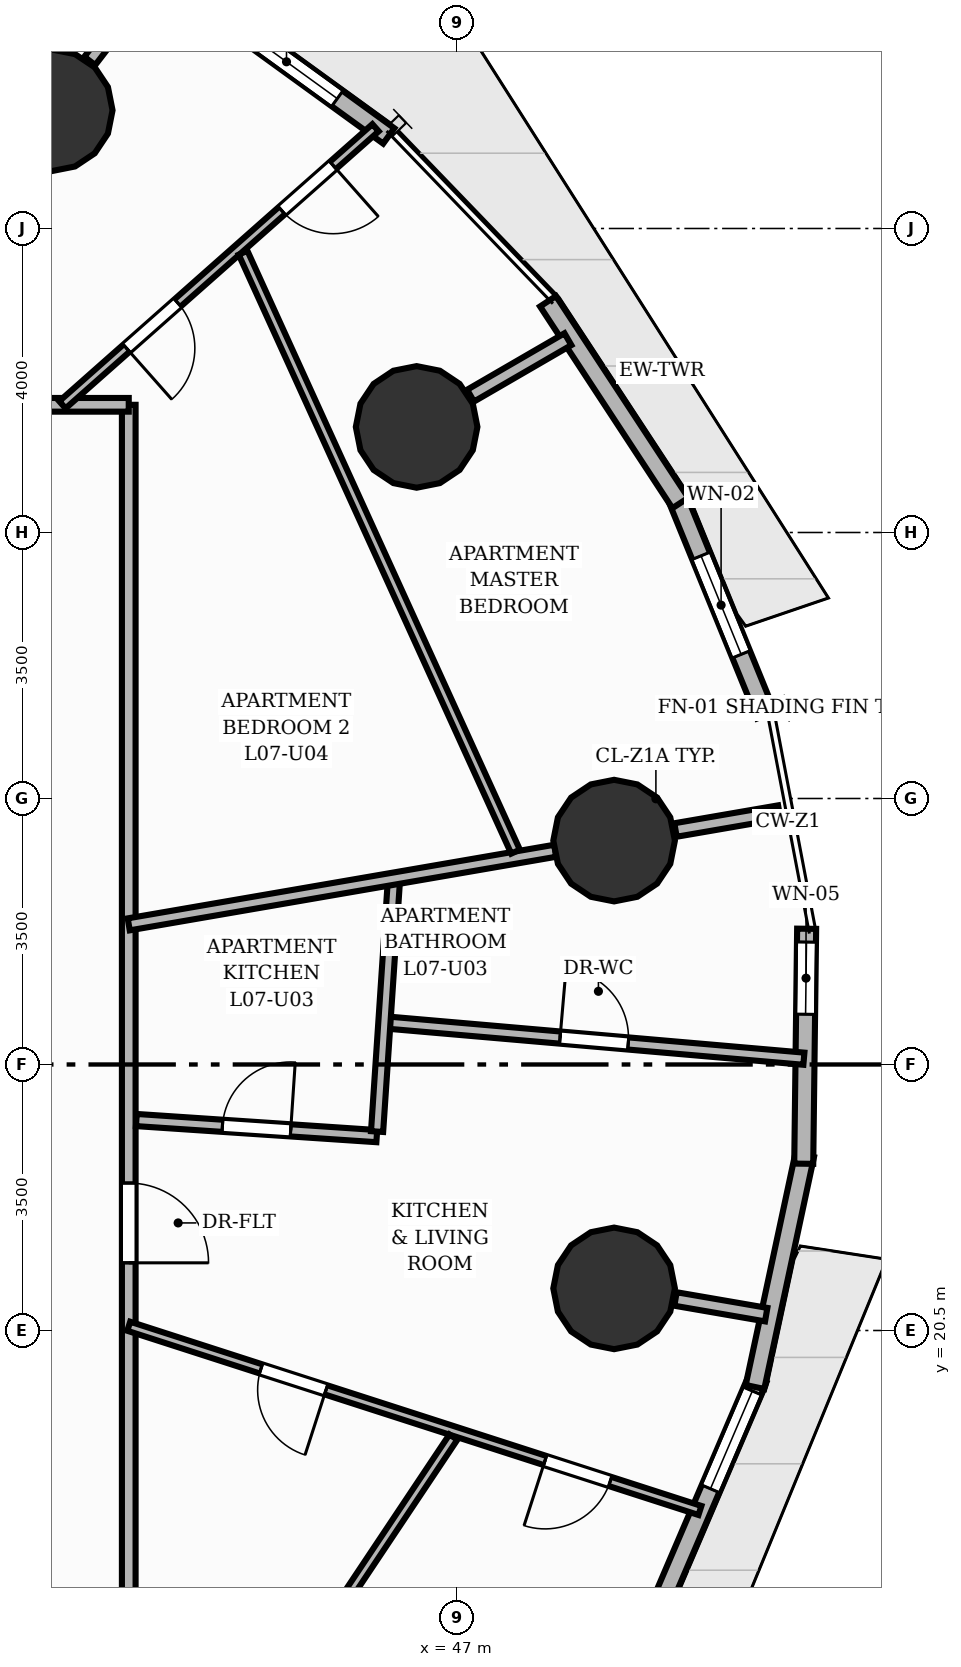
"""IFC4 building model, lengths in metres.
Left out: names, types, materials, properties, quantities, classifications, styles, units other than length and angle.
Written with IfcOpenShell. Run it as: python <this file> out.ifc"""

import sys

from ifc_helpers import new_model, si_unit, direction, frame, frame_2d, origin, origin_2d, place, context, subcontext, project, spatial, rectangle, circle, extrude, element, fill, save


model = new_model("IFC4")
c1 = context("Model", 3, precision=1e-05, world=origin(), true_north=direction((0.0, 1.0)))
c2 = subcontext(c1, "Body", "Model", "MODEL_VIEW")
j1 = project(units=[si_unit("LENGTHUNIT", "METRE"), si_unit("PLANEANGLEUNIT", "RADIAN")], contexts=[c1])
p1 = place(None, origin())
s1 = spatial("IfcSite", under=j1, at=p1, CompositionType="ELEMENT")
p2 = place(p1, origin())
s2 = spatial("IfcBuilding", under=s1, at=p2, CompositionType="ELEMENT")
p3 = place(p2, frame((0.0, 0.0, 28.0)))
s3 = spatial("IfcBuildingStorey", under=s2, at=p3, CompositionType="ELEMENT", Elevation=28.0)
for number, where, z_axis, x_axis in (
    (1, (49.066, 26.946, 0.0), (0.0, 0.0, 1.0), (1.0, 0.0, 0.0)),
    (2, (46.468, 32.389, 0.0), (0.0, 0.0, 1.0), (1.0, 0.0, 0.0)),
    (3, (41.667, 36.555, 0.0), (0.0, 0.0, 1.0), (1.0, 0.0, 0.0)),
    (4, (49.066, 21.054, 0.0), (0.0, 0.0, 1.0), (1.0, 0.0, 0.0)),
):
    element("IfcColumn", number, at=place(p3, frame(where, z_axis=z_axis, x_axis=x_axis)), inside=s3, PredefinedType="COLUMN", context=c2, shape_type="SweptSolid", body=[
        extrude(circle(Radius=0.8, at=origin_2d()), origin(), (0.0, 0.0, 1.0), 3.2),
    ])
p4 = place(p3, frame((49.885, 31.489, 0.0), z_axis=(0.0, 0.0, 1.0), x_axis=(0.377493207518, -0.926012353199, 0.0)))
e5 = element("IfcWall", 5, at=p4, inside=s3, PredefinedType="SOLIDWALL", context=c2, shape_type="SweptSolid", body=[
    extrude(rectangle(XDim=3.121, YDim=0.25, at=frame_2d((1.56, 0.0))), origin(), (0.0, 0.0, 1.0), 2.96),
])
p5 = place(p4, frame((0.86, 0.0, 0.85)))
e6 = element("IfcOpeningElement", 6, at=p5, cuts=e5, PredefinedType="OPENING", context=c2, shape_type="SweptSolid", body=[
    extrude(rectangle(XDim=1.4, YDim=1.55, at=frame_2d((0.7, 0.775))), frame((0.0, 0.135, 0.0), z_axis=(0.0, -1.0, 0.0), x_axis=(1.0, 0.0, 0.0)), (0.0, 0.0, 1.0), 0.27),
])
p6 = place(p3, frame((48.196, 34.042, 0.0), z_axis=(0.0, 0.0, 1.0), x_axis=(0.548579153619, -0.836098625889, 0.0)))
e7 = element("IfcWall", 7, at=p6, inside=s3, PredefinedType="SOLIDWALL", context=c2, shape_type="SweptSolid", body=[
    extrude(rectangle(XDim=3.174, YDim=0.25, at=frame_2d((1.587, 0.0))), origin(), (0.0, 0.0, 1.0), 2.96),
])
p7 = place(p3, frame((43.411, 38.168, 0.0), z_axis=(0.0, 0.0, 1.0), x_axis=(0.809637503316, -0.58693024562, 0.0)))
e8 = element("IfcWall", 8, at=p7, inside=s3, PredefinedType="SOLIDWALL", context=c2, shape_type="SweptSolid", body=[
    extrude(rectangle(XDim=3.323, YDim=0.25, at=frame_2d((1.661, 0.0))), origin(), (0.0, 0.0, 1.0), 2.96),
])
p8 = place(p7, frame((0.836, 0.0, 0.85)))
e9 = element("IfcOpeningElement", 9, at=p8, cuts=e8, PredefinedType="OPENING", context=c2, shape_type="SweptSolid", body=[
    extrude(rectangle(XDim=1.65, YDim=1.55, at=frame_2d((0.825, 0.775))), frame((0.0, 0.135, 0.0), z_axis=(0.0, -1.0, 0.0), x_axis=(1.0, 0.0, 0.0)), (0.0, 0.0, 1.0), 0.27),
])
p9 = place(p3, frame((50.954, 19.865, 0.0), z_axis=(0.0, 0.0, 1.0), x_axis=(-0.393733630937, -0.91922457967, 0.0)))
e10 = element("IfcWall", 10, at=p9, inside=s3, PredefinedType="SOLIDWALL", context=c2, shape_type="SweptSolid", body=[
    extrude(rectangle(XDim=3.174, YDim=0.25, at=frame_2d((1.587, 0.0))), origin(), (0.0, 0.0, 1.0), 2.96),
])
p10 = place(p9, frame((0.175, 0.0, 0.85)))
e11 = element("IfcOpeningElement", 11, at=p10, cuts=e10, PredefinedType="OPENING", context=c2, shape_type="SweptSolid", body=[
    extrude(rectangle(XDim=1.4, YDim=1.55, at=frame_2d((0.7, 0.775))), frame((0.0, 0.135, 0.0), z_axis=(0.0, -1.0, 0.0), x_axis=(1.0, 0.0, 0.0)), (0.0, 0.0, 1.0), 0.27),
])
p11 = place(p3, frame((51.573, 22.808, 0.0), z_axis=(0.0, 0.0, 1.0), x_axis=(-0.209668000253, -0.977772637002, 0.0)))
e12 = element("IfcWall", 12, at=p11, inside=s3, PredefinedType="SOLIDWALL", context=c2, shape_type="SweptSolid", body=[
    extrude(rectangle(XDim=3.121, YDim=0.25, at=frame_2d((1.56, 0.0))), origin(), (0.0, 0.0, 1.0), 2.96),
])
p12 = place(p3, frame((51.599, 25.786, 0.0), z_axis=(0.0, 0.0, 1.0), x_axis=(-0.012397373015, -0.999923149618, 0.0)))
e13 = element("IfcWall", 13, at=p12, inside=s3, PredefinedType="SOLIDWALL", context=c2, shape_type="SweptSolid", body=[
    extrude(rectangle(XDim=3.092, YDim=0.25, at=frame_2d((1.546, 0.0))), origin(), (0.0, 0.0, 1.0), 2.96),
])
p13 = place(p12, frame((0.175, 0.0, 0.85)))
e14 = element("IfcOpeningElement", 14, at=p13, cuts=e13, PredefinedType="OPENING", context=c2, shape_type="SweptSolid", body=[
    extrude(rectangle(XDim=0.95, YDim=1.45, at=frame_2d((0.475, 0.725))), frame((0.0, 0.135, 0.0), z_axis=(0.0, -1.0, 0.0), x_axis=(1.0, 0.0, 0.0)), (0.0, 0.0, 1.0), 0.27),
])
p14 = place(p3, frame((49.874, 27.085, 0.0), z_axis=(0.0, 0.0, 1.0), x_axis=(0.985429571056, 0.170083980696, 0.0)))
e15 = element("IfcWall", 15, at=p14, inside=s3, PredefinedType="PARTITIONING", context=c2, shape_type="SweptSolid", body=[
    extrude(rectangle(XDim=1.385, YDim=0.18, at=frame_2d((0.693, 0.0))), origin(), (0.0, 0.0, 1.0), 2.178),
])
p15 = place(p3, frame((47.177, 32.8, 0.0), z_axis=(0.0, 0.0, 1.0), x_axis=(0.865049792178, 0.501686014408, 0.0)))
e16 = element("IfcWall", 16, at=p15, inside=s3, PredefinedType="PARTITIONING", context=c2, shape_type="SweptSolid", body=[
    extrude(rectangle(XDim=1.481, YDim=0.18, at=frame_2d((0.74, 0.0))), origin(), (0.0, 0.0, 1.0), 2.178),
])
p16 = place(p3, frame((42.167, 37.205, 0.0), z_axis=(0.0, 0.0, 1.0), x_axis=(0.609967804345, 0.792426196982, 0.0)))
e17 = element("IfcWall", 17, at=p16, inside=s3, PredefinedType="PARTITIONING", context=c2, shape_type="SweptSolid", body=[
    extrude(rectangle(XDim=1.377, YDim=0.18, at=frame_2d((0.688, 0.0))), origin(), (0.0, 0.0, 1.0), 2.178),
])
p17 = place(p3, frame((49.874, 20.915, 0.0), z_axis=(0.0, 0.0, 1.0), x_axis=(0.985412344637, -0.170183756676, 0.0)))
e18 = element("IfcWall", 18, at=p17, inside=s3, PredefinedType="PARTITIONING", context=c2, shape_type="SweptSolid", body=[
    extrude(rectangle(XDim=1.211, YDim=0.18, at=frame_2d((0.605, 0.0))), origin(), (0.0, 0.0, 1.0), 2.178),
])
p18 = place(p3, frame((42.68, 32.68, 0.0), z_axis=(0.0, 0.0, 1.0), x_axis=(0.0, -1.0, 0.0)))
e19 = element("IfcWall", 19, at=p18, inside=s3, PredefinedType="PARTITIONING", context=c2, shape_type="SweptSolid", body=[
    extrude(rectangle(XDim=17.36, YDim=0.18, at=frame_2d((8.68, 0.0))), origin(), (0.0, 0.0, 1.0), 2.955),
])
p19 = place(p18, frame((10.24, 0.0, 0.0)))
e20 = element("IfcOpeningElement", 20, at=p19, cuts=e19, PredefinedType="OPENING", context=c2, shape_type="SweptSolid", body=[
    extrude(rectangle(XDim=1.05, YDim=2.15, at=frame_2d((0.525, 1.075))), frame((0.0, 0.1, 0.0), z_axis=(0.0, -1.0, 0.0), x_axis=(1.0, 0.0, 0.0)), (0.0, 0.0, 1.0), 0.2),
])
p20 = place(p3, frame((30.102, 32.68, 0.0), z_axis=(0.0, 0.0, 1.0), x_axis=(1.0, 0.0, 0.0)))
e21 = element("IfcWall", 21, at=p20, inside=s3, PredefinedType="PARTITIONING", context=c2, shape_type="SweptSolid", body=[
    extrude(rectangle(XDim=12.578, YDim=0.18, at=frame_2d((6.289, 0.0))), origin(), (0.0, 0.0, 1.0), 2.955),
])
p21 = place(p20, frame((8.233, 0.0, 0.0)))
e22 = element("IfcOpeningElement", 22, at=p21, cuts=e21, PredefinedType="OPENING", context=c2, shape_type="SweptSolid", body=[
    extrude(rectangle(XDim=1.05, YDim=2.15, at=frame_2d((0.525, 1.075))), frame((0.0, 0.1, 0.0), z_axis=(0.0, -1.0, 0.0), x_axis=(1.0, 0.0, 0.0)), (0.0, 0.0, 1.0), 0.2),
])
p22 = place(p3, frame((46.044, 24.555, 0.0), z_axis=(0.0, 0.0, 1.0), x_axis=(0.996262385211, -0.086378584226, 0.0)))
e23 = element("IfcWall", 23, at=p22, inside=s3, PredefinedType="PLUMBINGWALL", context=c2, shape_type="SweptSolid", body=[
    extrude(rectangle(XDim=5.54, YDim=0.16, at=frame_2d((2.77, 0.0))), origin(), (0.0, 0.0, 1.0), 2.641),
])
p23 = place(p22, frame((2.32, 0.0, 0.0)))
e24 = element("IfcOpeningElement", 24, at=p23, cuts=e23, PredefinedType="OPENING", context=c2, shape_type="SweptSolid", body=[
    extrude(rectangle(XDim=0.9, YDim=2.1, at=frame_2d((0.45, 1.05))), frame((0.0, 0.09, 0.0), z_axis=(0.0, -1.0, 0.0), x_axis=(1.0, 0.0, 0.0)), (0.0, 0.0, 1.0), 0.18),
])
p24 = place(p3, frame((50.195, 18.132, 0.0), z_axis=(0.0, 0.0, 1.0), x_axis=(-0.951723769721, 0.306955804879, 0.0)))
e25 = element("IfcWall", 25, at=p24, inside=s3, PredefinedType="PARTITIONING", context=c2, shape_type="SweptSolid", body=[
    extrude(rectangle(XDim=7.896, YDim=0.125, at=frame_2d((3.948, 0.0))), origin(), (0.0, 0.0, 1.0), 2.955),
])
p25 = place(p24, frame((1.241, 0.0, 0.0)))
e26 = element("IfcOpeningElement", 26, at=p25, cuts=e25, PredefinedType="OPENING", context=c2, shape_type="SweptSolid", body=[
    extrude(rectangle(XDim=0.9, YDim=2.1, at=frame_2d((0.45, 1.05))), frame((0.0, 0.073, 0.0), z_axis=(0.0, -1.0, 0.0), x_axis=(1.0, 0.0, 0.0)), (0.0, 0.0, 1.0), 0.145),
])
p26 = place(p24, frame((5.169, 0.0, 0.0)))
e27 = element("IfcOpeningElement", 27, at=p26, cuts=e25, PredefinedType="OPENING", context=c2, shape_type="SweptSolid", body=[
    extrude(rectangle(XDim=0.9, YDim=2.1, at=frame_2d((0.45, 1.05))), frame((0.0, 0.073, 0.0), z_axis=(0.0, -1.0, 0.0), x_axis=(1.0, 0.0, 0.0)), (0.0, 0.0, 1.0), 0.145),
])
p27 = place(p3, frame((42.78, 23.269, 0.0), z_axis=(0.0, 0.0, 1.0), x_axis=(0.99776911562, -0.066759208461, 0.0)))
e28 = element("IfcWall", 28, at=p27, inside=s3, PredefinedType="PLUMBINGWALL", context=c2, shape_type="SweptSolid", body=[
    extrude(rectangle(XDim=3.171, YDim=0.16, at=frame_2d((1.585, 0.0))), origin(), (0.0, 0.0, 1.0), 2.641),
])
p28 = place(p27, frame((1.135, 0.0, 0.0)))
e29 = element("IfcOpeningElement", 29, at=p28, cuts=e28, PredefinedType="OPENING", context=c2, shape_type="SweptSolid", body=[
    extrude(rectangle(XDim=0.9, YDim=2.1, at=frame_2d((0.45, 1.05))), frame((0.0, 0.09, 0.0), z_axis=(0.0, -1.0, 0.0), x_axis=(1.0, 0.0, 0.0)), (0.0, 0.0, 1.0), 0.18),
])
p29 = place(p3, frame((45.947, 23.117, 0.0), z_axis=(0.0, 0.0, 1.0), x_axis=(0.066888153037, 0.997760479766, 0.0)))
e30 = element("IfcWall", 30, at=p29, inside=s3, PredefinedType="PLUMBINGWALL", context=c2, shape_type="SweptSolid", body=[
    extrude(rectangle(XDim=3.336, YDim=0.16, at=frame_2d((1.668, 0.0))), origin(), (0.0, 0.0, 1.0), 2.955),
])
p30 = place(p3, frame((42.68, 25.844, 0.0), z_axis=(0.0, 0.0, 1.0), x_axis=(0.985435597438, 0.170049061456, 0.0)))
e31 = element("IfcWall", 31, at=p30, inside=s3, PredefinedType="PLUMBINGWALL", context=c2, shape_type="SweptSolid", body=[
    extrude(rectangle(XDim=5.694, YDim=0.16, at=frame_2d((2.847, 0.0))), origin(), (0.0, 0.0, 1.0), 2.178),
])
p31 = place(p3, frame((42.24, 12.037, 0.0), z_axis=(0.0, 0.0, 1.0), x_axis=(0.55508513016, 0.831793543059, 0.0)))
e32 = element("IfcWall", 32, at=p31, inside=s3, PredefinedType="PARTITIONING", context=c2, shape_type="SweptSolid", body=[
    extrude(rectangle(XDim=8.488, YDim=0.125, at=frame_2d((4.244, 0.0))), origin(), (0.0, 0.0, 1.0), 2.328),
])
p32 = place(p3, frame((45.927, 36.326, 0.0), z_axis=(0.0, 0.0, 1.0), x_axis=(-0.748844909992, -0.662745275939, 0.0)))
e33 = element("IfcWall", 33, at=p32, inside=s3, PredefinedType="PARTITIONING", context=c2, shape_type="SweptSolid", body=[
    extrude(rectangle(XDim=5.501, YDim=0.125, at=frame_2d((2.75, 0.0))), origin(), (0.0, 0.0, 1.0), 2.955),
])
p33 = place(p32, frame((0.746, 0.0, 0.0)))
e34 = element("IfcOpeningElement", 34, at=p33, cuts=e33, PredefinedType="OPENING", context=c2, shape_type="SweptSolid", body=[
    extrude(rectangle(XDim=0.9, YDim=2.1, at=frame_2d((0.45, 1.05))), frame((0.0, 0.073, 0.0), z_axis=(0.0, -1.0, 0.0), x_axis=(1.0, 0.0, 0.0)), (0.0, 0.0, 1.0), 0.145),
])
p34 = place(p32, frame((3.476, 0.0, 0.0)))
e35 = element("IfcOpeningElement", 35, at=p34, cuts=e33, PredefinedType="OPENING", context=c2, shape_type="SweptSolid", body=[
    extrude(rectangle(XDim=0.9, YDim=2.1, at=frame_2d((0.45, 1.05))), frame((0.0, 0.073, 0.0), z_axis=(0.0, -1.0, 0.0), x_axis=(1.0, 0.0, 0.0)), (0.0, 0.0, 1.0), 0.145),
])
p35 = place(p3, frame((47.769, 26.801, 0.0), z_axis=(0.0, 0.0, 1.0), x_axis=(-0.414076998559, 0.910241857565, 0.0)))
e36 = element("IfcWall", 36, at=p35, inside=s3, PredefinedType="PARTITIONING", context=c2, shape_type="SweptSolid", body=[
    extrude(rectangle(XDim=8.658, YDim=0.125, at=frame_2d((4.329, 0.0))), origin(), (0.0, 0.0, 1.0), 2.328),
])
p36 = place(p5, origin())
e37 = element("IfcWindow", 37, at=p36, inside=s3, PartitioningType="SINGLE_PANEL", PredefinedType="WINDOW", context=c2, shape_type="SweptSolid", body=[
    extrude(rectangle(XDim=1.4, YDim=1.55, at=frame_2d((0.7, 0.775))), frame((0.0, 0.03, 0.0), z_axis=(0.0, -1.0, 0.0), x_axis=(1.0, 0.0, 0.0)), (0.0, 0.0, 1.0), 0.06),
])
fill(e6, e37)
p37 = place(p8, origin())
e38 = element("IfcWindow", 38, at=p37, inside=s3, PartitioningType="SINGLE_PANEL", PredefinedType="WINDOW", context=c2, shape_type="SweptSolid", body=[
    extrude(rectangle(XDim=1.65, YDim=1.55, at=frame_2d((0.825, 0.775))), frame((0.0, 0.03, 0.0), z_axis=(0.0, -1.0, 0.0), x_axis=(1.0, 0.0, 0.0)), (0.0, 0.0, 1.0), 0.06),
])
fill(e9, e38)
p38 = place(p10, origin())
e39 = element("IfcWindow", 39, at=p38, inside=s3, PartitioningType="SINGLE_PANEL", PredefinedType="WINDOW", context=c2, shape_type="SweptSolid", body=[
    extrude(rectangle(XDim=1.4, YDim=1.55, at=frame_2d((0.7, 0.775))), frame((0.0, 0.03, 0.0), z_axis=(0.0, -1.0, 0.0), x_axis=(1.0, 0.0, 0.0)), (0.0, 0.0, 1.0), 0.06),
])
fill(e11, e39)
p39 = place(p13, origin())
e40 = element("IfcWindow", 40, at=p39, inside=s3, PartitioningType="SINGLE_PANEL", PredefinedType="WINDOW", context=c2, shape_type="SweptSolid", body=[
    extrude(rectangle(XDim=0.95, YDim=1.45, at=frame_2d((0.475, 0.725))), frame((0.0, 0.03, 0.0), z_axis=(0.0, -1.0, 0.0), x_axis=(1.0, 0.0, 0.0)), (0.0, 0.0, 1.0), 0.06),
])
fill(e14, e40)
p40 = place(p19, origin())
e41 = element("IfcDoor", 41, at=p40, inside=s3, OperationType="SINGLE_SWING_RIGHT", PredefinedType="DOOR", context=c2, shape_type="SweptSolid", body=[
    extrude(rectangle(XDim=1.05, YDim=2.15, at=frame_2d((0.525, 1.075))), frame((0.0, 0.025, 0.0), z_axis=(0.0, -1.0, 0.0), x_axis=(1.0, 0.0, 0.0)), (0.0, 0.0, 1.0), 0.05),
])
fill(e20, e41)
p41 = place(p23, origin())
e42 = element("IfcDoor", 42, at=p41, inside=s3, OperationType="SINGLE_SWING_LEFT", PredefinedType="DOOR", context=c2, shape_type="SweptSolid", body=[
    extrude(rectangle(XDim=0.9, YDim=2.1, at=frame_2d((0.45, 1.05))), frame((0.0, 0.025, 0.0), z_axis=(0.0, -1.0, 0.0), x_axis=(1.0, 0.0, 0.0)), (0.0, 0.0, 1.0), 0.05),
])
fill(e24, e42)
p42 = place(p25, origin())
e43 = element("IfcDoor", 43, at=p42, inside=s3, OperationType="SINGLE_SWING_RIGHT", PredefinedType="DOOR", context=c2, shape_type="SweptSolid", body=[
    extrude(rectangle(XDim=0.9, YDim=2.1, at=frame_2d((0.45, 1.05))), frame((0.0, 0.025, 0.0), z_axis=(0.0, -1.0, 0.0), x_axis=(1.0, 0.0, 0.0)), (0.0, 0.0, 1.0), 0.05),
])
fill(e26, e43)
p43 = place(p26, origin())
e44 = element("IfcDoor", 44, at=p43, inside=s3, OperationType="SINGLE_SWING_LEFT", PredefinedType="DOOR", context=c2, shape_type="SweptSolid", body=[
    extrude(rectangle(XDim=0.9, YDim=2.1, at=frame_2d((0.45, 1.05))), frame((0.0, 0.025, 0.0), z_axis=(0.0, -1.0, 0.0), x_axis=(1.0, 0.0, 0.0)), (0.0, 0.0, 1.0), 0.05),
])
fill(e27, e44)
p44 = place(p28, origin())
e45 = element("IfcDoor", 45, at=p44, inside=s3, OperationType="SINGLE_SWING_RIGHT", PredefinedType="DOOR", context=c2, shape_type="SweptSolid", body=[
    extrude(rectangle(XDim=0.9, YDim=2.1, at=frame_2d((0.45, 1.05))), frame((0.0, 0.025, 0.0), z_axis=(0.0, -1.0, 0.0), x_axis=(1.0, 0.0, 0.0)), (0.0, 0.0, 1.0), 0.05),
])
fill(e29, e45)
p45 = place(p33, origin())
e46 = element("IfcDoor", 46, at=p45, inside=s3, OperationType="SINGLE_SWING_LEFT", PredefinedType="DOOR", context=c2, shape_type="SweptSolid", body=[
    extrude(rectangle(XDim=0.9, YDim=2.1, at=frame_2d((0.45, 1.05))), frame((0.0, 0.025, 0.0), z_axis=(0.0, -1.0, 0.0), x_axis=(1.0, 0.0, 0.0)), (0.0, 0.0, 1.0), 0.05),
])
fill(e34, e46)
p46 = place(p34, origin())
e47 = element("IfcDoor", 47, at=p46, inside=s3, OperationType="SINGLE_SWING_RIGHT", PredefinedType="DOOR", context=c2, shape_type="SweptSolid", body=[
    extrude(rectangle(XDim=0.9, YDim=2.1, at=frame_2d((0.45, 1.05))), frame((0.0, 0.025, 0.0), z_axis=(0.0, -1.0, 0.0), x_axis=(1.0, 0.0, 0.0)), (0.0, 0.0, 1.0), 0.05),
])
fill(e35, e47)
save(model, sys.argv[1])
